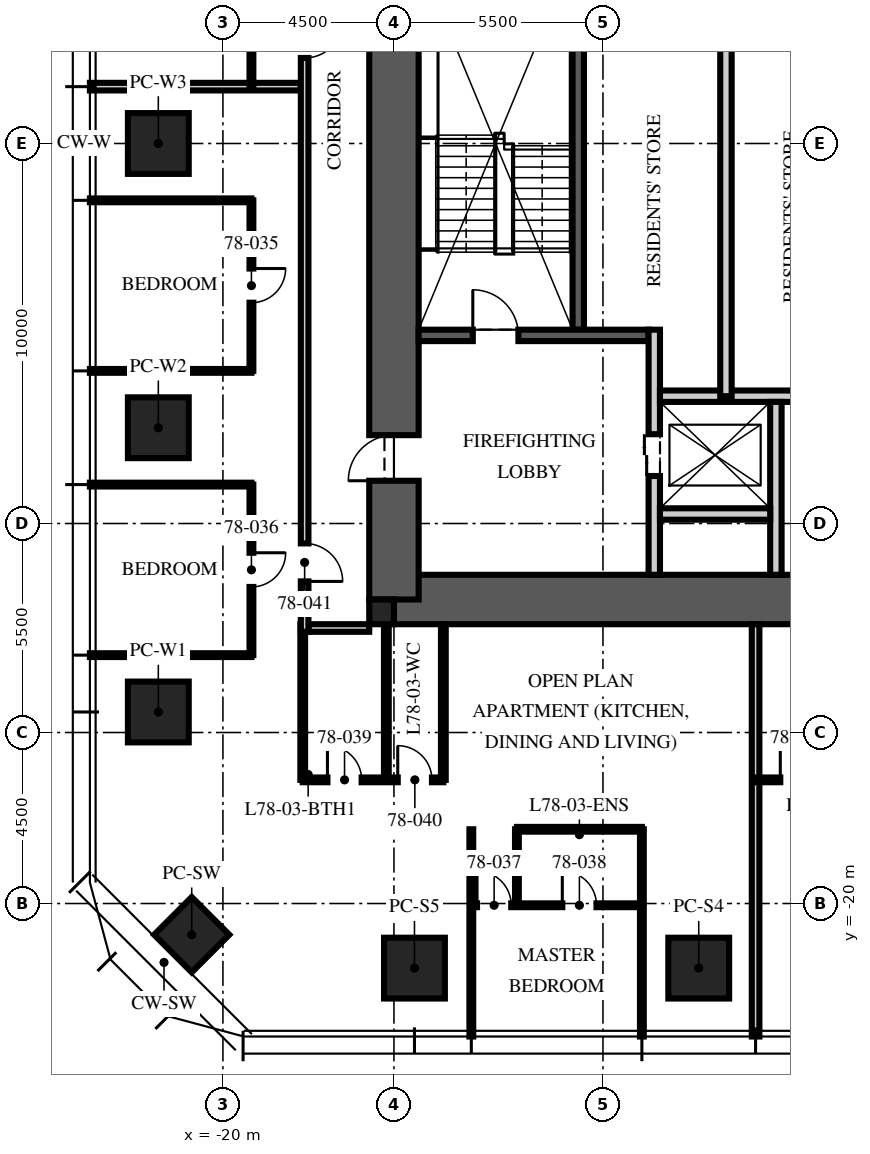
"""IFC4 building model, lengths in metres.
Left out: names, types, materials, properties, quantities, classifications, styles, units other than length and angle.
Written with IfcOpenShell. Run it as: python <this file> out.ifc"""

import sys

from ifc_helpers import new_model, si_unit, direction, frame, frame_2d, origin, origin_2d, place, context, subcontext, project, spatial, rectangle, extrude, element, fill, save


model = new_model("IFC4")
c1 = context("Model", 3, precision=1e-05, world=origin(), true_north=direction((0.0, 1.0)))
c2 = subcontext(c1, "Body", "Model", "MODEL_VIEW")
j1 = project(units=[si_unit("LENGTHUNIT", "METRE"), si_unit("PLANEANGLEUNIT", "RADIAN")], contexts=[c1])
p1 = place(None, origin())
s1 = spatial("IfcSite", under=j1, at=p1, CompositionType="ELEMENT")
p2 = place(p1, origin())
s2 = spatial("IfcBuilding", under=s1, at=p2, CompositionType="ELEMENT")
p3 = place(p2, frame((0.0, 0.0, 312.0)))
s3 = spatial("IfcBuildingStorey", under=s2, at=p3, CompositionType="ELEMENT", Elevation=312.0)
p4 = place(p3, frame((-15.5, -12.0, -0.25), z_axis=(0.0, 0.0, 1.0), x_axis=(1.0, 0.0, 0.0)))
e1 = element("IfcWall", 1, at=p4, inside=s3, PredefinedType="SHEAR", context=c2, shape_type="SweptSolid", body=[
    extrude(rectangle(XDim=31.0, YDim=1.3, at=frame_2d((15.5, 0.0))), origin(), (0.0, 0.0, 1.0), 3.75),
])
p5 = place(p3, frame((-15.5, -12.0, -0.25), z_axis=(0.0, 0.0, 1.0), x_axis=(0.0, 1.0, 0.0)))
e2 = element("IfcWall", 2, at=p5, inside=s3, PredefinedType="SHEAR", context=c2, shape_type="SweptSolid", body=[
    extrude(rectangle(XDim=24.0, YDim=1.3, at=frame_2d((12.0, 0.0))), origin(), (0.0, 0.0, 1.0), 3.75),
])
p6 = place(p5, frame((3.125, 0.0, 0.25)))
e3 = element("IfcOpeningElement", 3, at=p6, cuts=e2, PredefinedType="OPENING", context=c2, shape_type="SweptSolid", body=[
    extrude(rectangle(XDim=1.2, YDim=2.1, at=frame_2d((0.6, 1.05))), frame((0.0, 0.66, 0.0), z_axis=(0.0, -1.0, 0.0), x_axis=(1.0, 0.0, 0.0)), (0.0, 0.0, 1.0), 1.32),
])
p7 = place(p5, frame((19.375, 0.0, 0.25)))
e4 = element("IfcOpeningElement", 4, at=p7, cuts=e2, PredefinedType="OPENING", context=c2, shape_type="SweptSolid", body=[
    extrude(rectangle(XDim=1.8, YDim=2.1, at=frame_2d((0.9, 1.05))), frame((0.0, 0.66, 0.0), z_axis=(0.0, -1.0, 0.0), x_axis=(1.0, 0.0, 0.0)), (0.0, 0.0, 1.0), 1.32),
])
p8 = place(p3, frame((-15.825, -12.325, -0.25), z_axis=(0.0, 0.0, 1.0), x_axis=(1.0, 0.0, 0.0)))
e5 = element("IfcColumn", 5, at=p8, inside=s3, PredefinedType="COLUMN", context=c2, shape_type="SweptSolid", body=[
    extrude(rectangle(XDim=0.65, YDim=0.65, at=origin_2d()), origin(), (0.0, 0.0, 1.0), 3.75),
])
for number, where, z_axis, x_axis in (
    (6, (-7.48, -21.7, 0.0), (0.0, 0.0, 1.0), (1.0, 0.0, 0.0)),
    (7, (-14.96, -21.7, 0.0), (0.0, 0.0, 1.0), (1.0, 0.0, 0.0)),
    (8, (-21.7, -14.96, 0.0), (0.0, 0.0, 1.0), (0.0, 1.0, 0.0)),
    (9, (-21.7, -7.48, 0.0), (0.0, 0.0, 1.0), (0.0, 1.0, 0.0)),
    (10, (-21.7, 0.0, 0.0), (0.0, 0.0, 1.0), (0.0, 1.0, 0.0)),
):
    element("IfcColumn", number, at=place(p3, frame(where, z_axis=z_axis, x_axis=x_axis)), inside=s3, PredefinedType="COLUMN", context=c2, shape_type="SweptSolid", body=[
        extrude(rectangle(XDim=1.6, YDim=1.6, at=origin_2d()), origin(), (0.0, 0.0, 1.0), 3.75),
    ])
p9 = place(p3, frame((-20.821, -20.821, 0.0), z_axis=(0.0, 0.0, 1.0), x_axis=(0.707106781187, -0.707106781187, 0.0)))
e11 = element("IfcColumn", 11, at=p9, inside=s3, PredefinedType="COLUMN", context=c2, shape_type="SweptSolid", body=[
    extrude(rectangle(XDim=1.4, YDim=1.4, at=origin_2d()), origin(), (0.0, 0.0, 1.0), 3.75),
])
p10 = place(p3, frame((-10.65, -4.9, 0.0), z_axis=(0.0, 0.0, 1.0), x_axis=(0.0, 1.0, 0.0)))
e12 = element("IfcWall", 12, at=p10, inside=s3, PredefinedType="SOLIDWALL", context=c2, shape_type="SweptSolid", body=[
    extrude(rectangle(XDim=10.1, YDim=0.3, at=frame_2d((5.05, 0.0))), origin(), (0.0, 0.0, 1.0), 3.5),
])
p11 = place(p3, frame((-14.85, -5.05, 0.0), z_axis=(0.0, 0.0, 1.0), x_axis=(1.0, 0.0, 0.0)))
e13 = element("IfcWall", 13, at=p11, inside=s3, PredefinedType="SOLIDWALL", context=c2, shape_type="SweptSolid", body=[
    extrude(rectangle(XDim=6.05, YDim=0.3, at=frame_2d((3.025, 0.0))), origin(), (0.0, 0.0, 1.0), 3.5),
])
p12 = place(p11, frame((1.425, 0.0, 0.0)))
e14 = element("IfcOpeningElement", 14, at=p12, cuts=e13, PredefinedType="OPENING", context=c2, shape_type="SweptSolid", body=[
    extrude(rectangle(XDim=1.2, YDim=2.1, at=frame_2d((0.6, 1.05))), frame((0.0, 0.16, 0.0), z_axis=(0.0, -1.0, 0.0), x_axis=(1.0, 0.0, 0.0)), (0.0, 0.0, 1.0), 0.32),
])
p13 = place(p3, frame((-8.65, -11.35, 0.0), z_axis=(0.0, 0.0, 1.0), x_axis=(0.0, 1.0, 0.0)))
e15 = element("IfcWall", 15, at=p13, inside=s3, PredefinedType="PARTITIONING", context=c2, shape_type="SweptSolid", body=[
    extrude(rectangle(XDim=6.45, YDim=0.3, at=frame_2d((3.225, 0.0))), origin(), (0.0, 0.0, 1.0), 3.5),
])
p14 = place(p13, frame((2.6, 0.0, 0.0)))
e16 = element("IfcOpeningElement", 16, at=p14, cuts=e15, PredefinedType="OPENING", context=c2, shape_type="SweptSolid", body=[
    extrude(rectangle(XDim=1.1, YDim=2.1, at=frame_2d((0.55, 1.05))), frame((0.0, 0.16, 0.0), z_axis=(0.0, -1.0, 0.0), x_axis=(1.0, 0.0, 0.0)), (0.0, 0.0, 1.0), 0.32),
])
p15 = place(p3, frame((-8.5, -6.65, 0.0), z_axis=(0.0, 0.0, 1.0), x_axis=(1.0, 0.0, 0.0)))
e17 = element("IfcWall", 17, at=p15, inside=s3, PredefinedType="PARTITIONING", context=c2, shape_type="SweptSolid", body=[
    extrude(rectangle(XDim=17.0, YDim=0.3, at=frame_2d((8.5, 0.0))), origin(), (0.0, 0.0, 1.0), 3.5),
])
p16 = place(p15, frame((7.8, 0.0, 0.0)))
e18 = element("IfcOpeningElement", 18, at=p16, cuts=e17, PredefinedType="OPENING", context=c2, shape_type="SweptSolid", body=[
    extrude(rectangle(XDim=1.3, YDim=2.4, at=frame_2d((0.65, 1.2))), frame((0.0, 0.16, 0.0), z_axis=(0.0, -1.0, 0.0), x_axis=(1.0, 0.0, 0.0)), (0.0, 0.0, 1.0), 0.32),
])
p17 = place(p15, frame((5.65, 0.0, 0.0)))
e19 = element("IfcOpeningElement", 19, at=p17, cuts=e17, PredefinedType="OPENING", context=c2, shape_type="SweptSolid", body=[
    extrude(rectangle(XDim=0.9, YDim=2.1, at=frame_2d((0.45, 1.05))), frame((0.0, 0.16, 0.0), z_axis=(0.0, -1.0, 0.0), x_axis=(1.0, 0.0, 0.0)), (0.0, 0.0, 1.0), 0.32),
])
p18 = place(p15, frame((10.4, 0.0, 0.0)))
e20 = element("IfcOpeningElement", 20, at=p18, cuts=e17, PredefinedType="OPENING", context=c2, shape_type="SweptSolid", body=[
    extrude(rectangle(XDim=0.9, YDim=2.1, at=frame_2d((0.45, 1.05))), frame((0.0, 0.16, 0.0), z_axis=(0.0, -1.0, 0.0), x_axis=(1.0, 0.0, 0.0)), (0.0, 0.0, 1.0), 0.32),
])
p19 = place(p3, frame((-5.45, -11.35, 0.0), z_axis=(0.0, 0.0, 1.0), x_axis=(0.0, 1.0, 0.0)))
e21 = element("IfcWall", 21, at=p19, inside=s3, PredefinedType="PARTITIONING", context=c2, shape_type="SweptSolid", body=[
    extrude(rectangle(XDim=4.55, YDim=0.3, at=frame_2d((2.275, 0.0))), origin(), (0.0, 0.0, 1.0), 3.5),
])
p20 = place(p3, frame((-8.5, -9.75, 0.0), z_axis=(0.0, 0.0, 1.0), x_axis=(1.0, 0.0, 0.0)))
e22 = element("IfcWall", 22, at=p20, inside=s3, PredefinedType="PARTITIONING", context=c2, shape_type="SweptSolid", body=[
    extrude(rectangle(XDim=2.9, YDim=0.3, at=frame_2d((1.45, 0.0))), origin(), (0.0, 0.0, 1.0), 3.5),
])
p21 = place(p3, frame((-6.764, -6.65, 0.0), z_axis=(0.0, 0.0, 1.0), x_axis=(0.0, 1.0, 0.0)))
e23 = element("IfcWall", 23, at=p21, inside=s3, PredefinedType="PARTITIONING", context=c2, shape_type="SweptSolid", body=[
    extrude(rectangle(XDim=9.45, YDim=0.3, at=frame_2d((4.725, 0.0))), origin(), (0.0, 0.0, 1.0), 3.5),
])
p22 = place(p3, frame((-16.15, -12.75, 0.0), z_axis=(0.0, 0.0, 1.0), x_axis=(-1.0, 0.0, 0.0)))
e24 = element("IfcWall", 24, at=p22, inside=s3, PredefinedType="PARTITIONING", context=c2, shape_type="SweptSolid", body=[
    extrude(rectangle(XDim=1.6, YDim=0.2, at=frame_2d((0.8, 0.0))), origin(), (0.0, 0.0, 1.0), 2.6),
])
p23 = place(p3, frame((-17.95, 1.496, 0.0), z_axis=(0.0, 0.0, 1.0), x_axis=(-1.0, 0.0, 0.0)))
e25 = element("IfcWall", 25, at=p23, inside=s3, PredefinedType="PARTITIONING", context=c2, shape_type="SweptSolid", body=[
    extrude(rectangle(XDim=5.55, YDim=0.2, at=frame_2d((2.775, 0.0))), origin(), (0.0, 0.0, 1.0), 3.01),
])
for number, where, z_axis, x_axis in (
    (26, (-19.25, -1.496, 0.0), (0.0, 0.0, 1.0), (-1.0, 0.0, 0.0)),
    (27, (-19.25, -5.984, 0.0), (0.0, 0.0, 1.0), (-1.0, 0.0, 0.0)),
    (28, (-19.25, -8.976, 0.0), (0.0, 0.0, 1.0), (-1.0, 0.0, 0.0)),
    (29, (-19.25, -13.464, 0.0), (0.0, 0.0, 1.0), (-1.0, 0.0, 0.0)),
):
    element("IfcWall", number, at=place(p3, frame(where, z_axis=z_axis, x_axis=x_axis)), inside=s3, PredefinedType="PARTITIONING", context=c2, shape_type="SweptSolid", body=[
        extrude(rectangle(XDim=4.25, YDim=0.1, at=frame_2d((2.125, 0.0))), origin(), (0.0, 0.0, 1.0), 3.01),
    ])
for number, where, z_axis, x_axis in (
    (30, (-13.464, -18.046, 0.0), (0.0, 0.0, 1.0), (0.0, -1.0, 0.0)),
    (31, (-8.976, -18.046, 0.0), (0.0, 0.0, 1.0), (0.0, -1.0, 0.0)),
):
    element("IfcWall", number, at=place(p3, frame(where, z_axis=z_axis, x_axis=x_axis)), inside=s3, PredefinedType="PARTITIONING", context=c2, shape_type="SweptSolid", body=[
        extrude(rectangle(XDim=5.454, YDim=0.1, at=frame_2d((2.727, 0.0))), origin(), (0.0, 0.0, 1.0), 3.01),
    ])
p24 = place(p3, frame((-5.984, -12.65, 0.0), z_axis=(0.0, 0.0, 1.0), x_axis=(0.0, -1.0, 0.0)))
e32 = element("IfcWall", 32, at=p24, inside=s3, PredefinedType="PARTITIONING", context=c2, shape_type="SweptSolid", body=[
    extrude(rectangle(XDim=10.85, YDim=0.2, at=frame_2d((5.425, 0.0))), origin(), (0.0, 0.0, 1.0), 3.01),
])
p25 = place(p3, frame((-19.25, 5.984, 0.0), z_axis=(0.0, 0.0, 1.0), x_axis=(0.0, -1.0, 0.0)))
e33 = element("IfcWall", 33, at=p25, inside=s3, PredefinedType="PARTITIONING", context=c2, shape_type="SweptSolid", body=[
    extrude(rectangle(XDim=4.488, YDim=0.1, at=frame_2d((2.244, 0.0))), origin(), (0.0, 0.0, 1.0), 2.91),
])
p26 = place(p25, frame((1.794, 0.0, 0.0)))
e34 = element("IfcOpeningElement", 34, at=p26, cuts=e33, PredefinedType="OPENING", context=c2, shape_type="SweptSolid", body=[
    extrude(rectangle(XDim=0.9, YDim=2.1, at=frame_2d((0.45, 1.05))), frame((0.0, 0.06, 0.0), z_axis=(0.0, -1.0, 0.0), x_axis=(1.0, 0.0, 0.0)), (0.0, 0.0, 1.0), 0.12),
])
p27 = place(p3, frame((-19.25, -1.496, 0.0), z_axis=(0.0, 0.0, 1.0), x_axis=(0.0, -1.0, 0.0)))
e35 = element("IfcWall", 35, at=p27, inside=s3, PredefinedType="PARTITIONING", context=c2, shape_type="SweptSolid", body=[
    extrude(rectangle(XDim=4.488, YDim=0.1, at=frame_2d((2.244, 0.0))), origin(), (0.0, 0.0, 1.0), 2.91),
])
p28 = place(p27, frame((1.794, 0.0, 0.0)))
e36 = element("IfcOpeningElement", 36, at=p28, cuts=e35, PredefinedType="OPENING", context=c2, shape_type="SweptSolid", body=[
    extrude(rectangle(XDim=0.9, YDim=2.1, at=frame_2d((0.45, 1.05))), frame((0.0, 0.06, 0.0), z_axis=(0.0, -1.0, 0.0), x_axis=(1.0, 0.0, 0.0)), (0.0, 0.0, 1.0), 0.12),
])
p29 = place(p3, frame((-19.25, -8.976, 0.0), z_axis=(0.0, 0.0, 1.0), x_axis=(0.0, -1.0, 0.0)))
e37 = element("IfcWall", 37, at=p29, inside=s3, PredefinedType="PARTITIONING", context=c2, shape_type="SweptSolid", body=[
    extrude(rectangle(XDim=4.488, YDim=0.1, at=frame_2d((2.244, 0.0))), origin(), (0.0, 0.0, 1.0), 2.91),
])
p30 = place(p29, frame((1.794, 0.0, 0.0)))
e38 = element("IfcOpeningElement", 38, at=p30, cuts=e37, PredefinedType="OPENING", context=c2, shape_type="SweptSolid", body=[
    extrude(rectangle(XDim=0.9, YDim=2.1, at=frame_2d((0.45, 1.05))), frame((0.0, 0.06, 0.0), z_axis=(0.0, -1.0, 0.0), x_axis=(1.0, 0.0, 0.0)), (0.0, 0.0, 1.0), 0.12),
])
p31 = place(p3, frame((-13.464, -20.046, 0.0), z_axis=(0.0, 0.0, 1.0), x_axis=(1.0, 0.0, 0.0)))
e39 = element("IfcWall", 39, at=p31, inside=s3, PredefinedType="PARTITIONING", context=c2, shape_type="SweptSolid", body=[
    extrude(rectangle(XDim=4.488, YDim=0.1, at=frame_2d((2.244, 0.0))), origin(), (0.0, 0.0, 1.0), 2.91),
])
p32 = place(p31, frame((0.15, 0.0, 0.0)))
e40 = element("IfcOpeningElement", 40, at=p32, cuts=e39, PredefinedType="OPENING", context=c2, shape_type="SweptSolid", body=[
    extrude(rectangle(XDim=0.9, YDim=2.1, at=frame_2d((0.45, 1.05))), frame((0.0, 0.06, 0.0), z_axis=(0.0, -1.0, 0.0), x_axis=(1.0, 0.0, 0.0)), (0.0, 0.0, 1.0), 0.12),
])
p33 = place(p31, frame((2.394, 0.0, 0.0)))
e41 = element("IfcOpeningElement", 41, at=p33, cuts=e39, PredefinedType="OPENING", context=c2, shape_type="SweptSolid", body=[
    extrude(rectangle(XDim=0.9, YDim=2.1, at=frame_2d((0.45, 1.05))), frame((0.0, 0.06, 0.0), z_axis=(0.0, -1.0, 0.0), x_axis=(1.0, 0.0, 0.0)), (0.0, 0.0, 1.0), 0.12),
])
p34 = place(p3, frame((-12.264, -18.046, 0.0), z_axis=(0.0, 0.0, 1.0), x_axis=(0.0, -1.0, 0.0)))
e42 = element("IfcWall", 42, at=p34, inside=s3, PredefinedType="PARTITIONING", context=c2, shape_type="SweptSolid", body=[
    extrude(rectangle(XDim=2.0, YDim=0.1, at=frame_2d((1.0, 0.0))), origin(), (0.0, 0.0, 1.0), 3.5),
])
p35 = place(p3, frame((-12.264, -18.046, 0.0), z_axis=(0.0, 0.0, 1.0), x_axis=(1.0, 0.0, 0.0)))
e43 = element("IfcWall", 43, at=p35, inside=s3, PredefinedType="PARTITIONING", context=c2, shape_type="SweptSolid", body=[
    extrude(rectangle(XDim=3.288, YDim=0.125, at=frame_2d((1.644, 0.0))), origin(), (0.0, 0.0, 1.0), 2.91),
])
p36 = place(p3, frame((-17.9, -16.746, 0.0), z_axis=(0.0, 0.0, 1.0), x_axis=(1.0, 0.0, 0.0)))
e44 = element("IfcWall", 44, at=p36, inside=s3, PredefinedType="PARTITIONING", context=c2, shape_type="SweptSolid", body=[
    extrude(rectangle(XDim=3.7, YDim=0.125, at=frame_2d((1.85, 0.0))), origin(), (0.0, 0.0, 1.0), 2.9),
])
p37 = place(p36, frame((0.65, 0.0, 0.0)))
e45 = element("IfcOpeningElement", 45, at=p37, cuts=e44, PredefinedType="OPENING", context=c2, shape_type="SweptSolid", body=[
    extrude(rectangle(XDim=0.9, YDim=2.1, at=frame_2d((0.45, 1.05))), frame((0.0, 0.073, 0.0), z_axis=(0.0, -1.0, 0.0), x_axis=(1.0, 0.0, 0.0)), (0.0, 0.0, 1.0), 0.145),
])
p38 = place(p36, frame((2.5, 0.0, 0.0)))
e46 = element("IfcOpeningElement", 46, at=p38, cuts=e44, PredefinedType="OPENING", context=c2, shape_type="SweptSolid", body=[
    extrude(rectangle(XDim=0.9, YDim=2.1, at=frame_2d((0.45, 1.05))), frame((0.0, 0.073, 0.0), z_axis=(0.0, -1.0, 0.0), x_axis=(1.0, 0.0, 0.0)), (0.0, 0.0, 1.0), 0.145),
])
for number, where, z_axis, x_axis in (
    (47, (-17.9, -12.65, 0.0), (0.0, 0.0, 1.0), (0.0, -1.0, 0.0)),
    (48, (-15.7, -12.65, 0.0), (0.0, 0.0, 1.0), (0.0, -1.0, 0.0)),
):
    element("IfcWall", number, at=place(p3, frame(where, z_axis=z_axis, x_axis=x_axis)), inside=s3, PredefinedType="PARTITIONING", context=c2, shape_type="SweptSolid", body=[
        extrude(rectangle(XDim=4.096, YDim=0.125, at=frame_2d((2.048, 0.0))), origin(), (0.0, 0.0, 1.0), 2.6),
    ])
p39 = place(p3, frame((-14.2, -12.65, 0.0), z_axis=(0.0, 0.0, 1.0), x_axis=(0.0, -1.0, 0.0)))
e49 = element("IfcWall", 49, at=p39, inside=s3, PredefinedType="PARTITIONING", context=c2, shape_type="SweptSolid", body=[
    extrude(rectangle(XDim=4.096, YDim=0.125, at=frame_2d((2.048, 0.0))), origin(), (0.0, 0.0, 1.0), 3.5),
])
p40 = place(p3, frame((-5.984, -16.746, 0.0), z_axis=(0.0, 0.0, 1.0), x_axis=(1.0, 0.0, 0.0)))
e50 = element("IfcWall", 50, at=p40, inside=s3, PredefinedType="PARTITIONING", context=c2, shape_type="SweptSolid", body=[
    extrude(rectangle(XDim=5.9, YDim=0.125, at=frame_2d((2.95, 0.0))), origin(), (0.0, 0.0, 1.0), 2.9),
])
p41 = place(p40, frame((0.65, 0.0, 0.0)))
e51 = element("IfcOpeningElement", 51, at=p41, cuts=e50, PredefinedType="OPENING", context=c2, shape_type="SweptSolid", body=[
    extrude(rectangle(XDim=0.9, YDim=2.1, at=frame_2d((0.45, 1.05))), frame((0.0, 0.073, 0.0), z_axis=(0.0, -1.0, 0.0), x_axis=(1.0, 0.0, 0.0)), (0.0, 0.0, 1.0), 0.145),
])
p42 = place(p40, frame((2.85, 0.0, 0.0)))
e52 = element("IfcOpeningElement", 52, at=p42, cuts=e50, PredefinedType="OPENING", context=c2, shape_type="SweptSolid", body=[
    extrude(rectangle(XDim=0.9, YDim=2.1, at=frame_2d((0.45, 1.05))), frame((0.0, 0.073, 0.0), z_axis=(0.0, -1.0, 0.0), x_axis=(1.0, 0.0, 0.0)), (0.0, 0.0, 1.0), 0.145),
])
p43 = place(p40, frame((4.7, 0.0, 0.0)))
e53 = element("IfcOpeningElement", 53, at=p43, cuts=e50, PredefinedType="OPENING", context=c2, shape_type="SweptSolid", body=[
    extrude(rectangle(XDim=0.9, YDim=2.1, at=frame_2d((0.45, 1.05))), frame((0.0, 0.073, 0.0), z_axis=(0.0, -1.0, 0.0), x_axis=(1.0, 0.0, 0.0)), (0.0, 0.0, 1.0), 0.145),
])
p44 = place(p3, frame((-17.85, 12.65, 0.0), z_axis=(0.0, 0.0, 1.0), x_axis=(0.0, -1.0, 0.0)))
e54 = element("IfcWall", 54, at=p44, inside=s3, PredefinedType="PARTITIONING", context=c2, shape_type="SweptSolid", body=[
    extrude(rectangle(XDim=25.5, YDim=0.2, at=frame_2d((12.75, 0.0))), origin(), (0.0, 0.0, 1.0), 2.9),
])
p45 = place(p44, frame((9.4, 0.0, 0.0)))
e55 = element("IfcOpeningElement", 55, at=p45, cuts=e54, PredefinedType="OPENING", context=c2, shape_type="SweptSolid", body=[
    extrude(rectangle(XDim=1.0, YDim=2.2, at=frame_2d((0.5, 1.1))), frame((0.0, 0.11, 0.0), z_axis=(0.0, -1.0, 0.0), x_axis=(1.0, 0.0, 0.0)), (0.0, 0.0, 1.0), 0.22),
])
p46 = place(p44, frame((23.174, 0.0, 0.0)))
e56 = element("IfcOpeningElement", 56, at=p46, cuts=e54, PredefinedType="OPENING", context=c2, shape_type="SweptSolid", body=[
    extrude(rectangle(XDim=1.0, YDim=2.2, at=frame_2d((0.5, 1.1))), frame((0.0, 0.11, 0.0), z_axis=(0.0, -1.0, 0.0), x_axis=(1.0, 0.0, 0.0)), (0.0, 0.0, 1.0), 0.22),
])
p47 = place(p12, origin())
e57 = element("IfcDoor", 57, at=p47, inside=s3, OperationType="SINGLE_SWING_LEFT", PredefinedType="DOOR", context=c2, shape_type="SweptSolid", body=[
    extrude(rectangle(XDim=1.2, YDim=2.1, at=frame_2d((0.6, 1.05))), frame((0.0, 0.025, 0.0), z_axis=(0.0, -1.0, 0.0), x_axis=(1.0, 0.0, 0.0)), (0.0, 0.0, 1.0), 0.05),
])
fill(e14, e57)
p48 = place(p6, origin())
e58 = element("IfcDoor", 58, at=p48, inside=s3, OperationType="SINGLE_SWING_LEFT", PredefinedType="DOOR", context=c2, shape_type="SweptSolid", body=[
    extrude(rectangle(XDim=1.2, YDim=2.1, at=frame_2d((0.6, 1.05))), frame((0.0, 0.025, 0.0), z_axis=(0.0, -1.0, 0.0), x_axis=(1.0, 0.0, 0.0)), (0.0, 0.0, 1.0), 0.05),
])
fill(e3, e58)
p49 = place(p14, origin())
e59 = element("IfcDoor", 59, at=p49, inside=s3, OperationType="DOUBLE_DOOR_SLIDING", PredefinedType="DOOR", context=c2, shape_type="SweptSolid", body=[
    extrude(rectangle(XDim=1.1, YDim=2.1, at=frame_2d((0.55, 1.05))), frame((0.0, 0.025, 0.0), z_axis=(0.0, -1.0, 0.0), x_axis=(1.0, 0.0, 0.0)), (0.0, 0.0, 1.0), 0.05),
])
fill(e16, e59)
p50 = place(p45, origin())
e60 = element("IfcDoor", 60, at=p50, inside=s3, OperationType="SINGLE_SWING_LEFT", PredefinedType="DOOR", context=c2, shape_type="SweptSolid", body=[
    extrude(rectangle(XDim=1.0, YDim=2.2, at=frame_2d((0.5, 1.1))), frame((0.0, 0.025, 0.0), z_axis=(0.0, -1.0, 0.0), x_axis=(1.0, 0.0, 0.0)), (0.0, 0.0, 1.0), 0.05),
])
fill(e55, e60)
p51 = place(p28, origin())
e61 = element("IfcDoor", 61, at=p51, inside=s3, OperationType="SINGLE_SWING_LEFT", PredefinedType="DOOR", context=c2, shape_type="SweptSolid", body=[
    extrude(rectangle(XDim=0.9, YDim=2.1, at=frame_2d((0.45, 1.05))), frame((0.0, 0.025, 0.0), z_axis=(0.0, -1.0, 0.0), x_axis=(1.0, 0.0, 0.0)), (0.0, 0.0, 1.0), 0.05),
])
fill(e36, e61)
p52 = place(p30, origin())
e62 = element("IfcDoor", 62, at=p52, inside=s3, OperationType="SINGLE_SWING_LEFT", PredefinedType="DOOR", context=c2, shape_type="SweptSolid", body=[
    extrude(rectangle(XDim=0.9, YDim=2.1, at=frame_2d((0.45, 1.05))), frame((0.0, 0.025, 0.0), z_axis=(0.0, -1.0, 0.0), x_axis=(1.0, 0.0, 0.0)), (0.0, 0.0, 1.0), 0.05),
])
fill(e38, e62)
p53 = place(p32, origin())
e63 = element("IfcDoor", 63, at=p53, inside=s3, OperationType="SINGLE_SWING_LEFT", PredefinedType="DOOR", context=c2, shape_type="SweptSolid", body=[
    extrude(rectangle(XDim=0.9, YDim=2.1, at=frame_2d((0.45, 1.05))), frame((0.0, 0.025, 0.0), z_axis=(0.0, -1.0, 0.0), x_axis=(1.0, 0.0, 0.0)), (0.0, 0.0, 1.0), 0.05),
])
fill(e40, e63)
p54 = place(p33, origin())
e64 = element("IfcDoor", 64, at=p54, inside=s3, OperationType="SINGLE_SWING_LEFT", PredefinedType="DOOR", context=c2, shape_type="SweptSolid", body=[
    extrude(rectangle(XDim=0.9, YDim=2.1, at=frame_2d((0.45, 1.05))), frame((0.0, 0.025, 0.0), z_axis=(0.0, -1.0, 0.0), x_axis=(1.0, 0.0, 0.0)), (0.0, 0.0, 1.0), 0.05),
])
fill(e41, e64)
p55 = place(p37, origin())
e65 = element("IfcDoor", 65, at=p55, inside=s3, OperationType="SINGLE_SWING_LEFT", PredefinedType="DOOR", context=c2, shape_type="SweptSolid", body=[
    extrude(rectangle(XDim=0.9, YDim=2.1, at=frame_2d((0.45, 1.05))), frame((0.0, 0.025, 0.0), z_axis=(0.0, -1.0, 0.0), x_axis=(1.0, 0.0, 0.0)), (0.0, 0.0, 1.0), 0.05),
])
fill(e45, e65)
p56 = place(p38, origin())
e66 = element("IfcDoor", 66, at=p56, inside=s3, OperationType="SINGLE_SWING_LEFT", PredefinedType="DOOR", context=c2, shape_type="SweptSolid", body=[
    extrude(rectangle(XDim=0.9, YDim=2.1, at=frame_2d((0.45, 1.05))), frame((0.0, 0.025, 0.0), z_axis=(0.0, -1.0, 0.0), x_axis=(1.0, 0.0, 0.0)), (0.0, 0.0, 1.0), 0.05),
])
fill(e46, e66)
p57 = place(p46, origin())
e67 = element("IfcDoor", 67, at=p57, inside=s3, OperationType="SINGLE_SWING_RIGHT", PredefinedType="DOOR", context=c2, shape_type="SweptSolid", body=[
    extrude(rectangle(XDim=1.0, YDim=2.2, at=frame_2d((0.5, 1.1))), frame((0.0, 0.025, 0.0), z_axis=(0.0, -1.0, 0.0), x_axis=(1.0, 0.0, 0.0)), (0.0, 0.0, 1.0), 0.05),
])
fill(e56, e67)
p58 = place(p41, origin())
e68 = element("IfcDoor", 68, at=p58, inside=s3, OperationType="SINGLE_SWING_LEFT", PredefinedType="DOOR", context=c2, shape_type="SweptSolid", body=[
    extrude(rectangle(XDim=0.9, YDim=2.1, at=frame_2d((0.45, 1.05))), frame((0.0, 0.025, 0.0), z_axis=(0.0, -1.0, 0.0), x_axis=(1.0, 0.0, 0.0)), (0.0, 0.0, 1.0), 0.05),
])
fill(e51, e68)
save(model, sys.argv[1])
